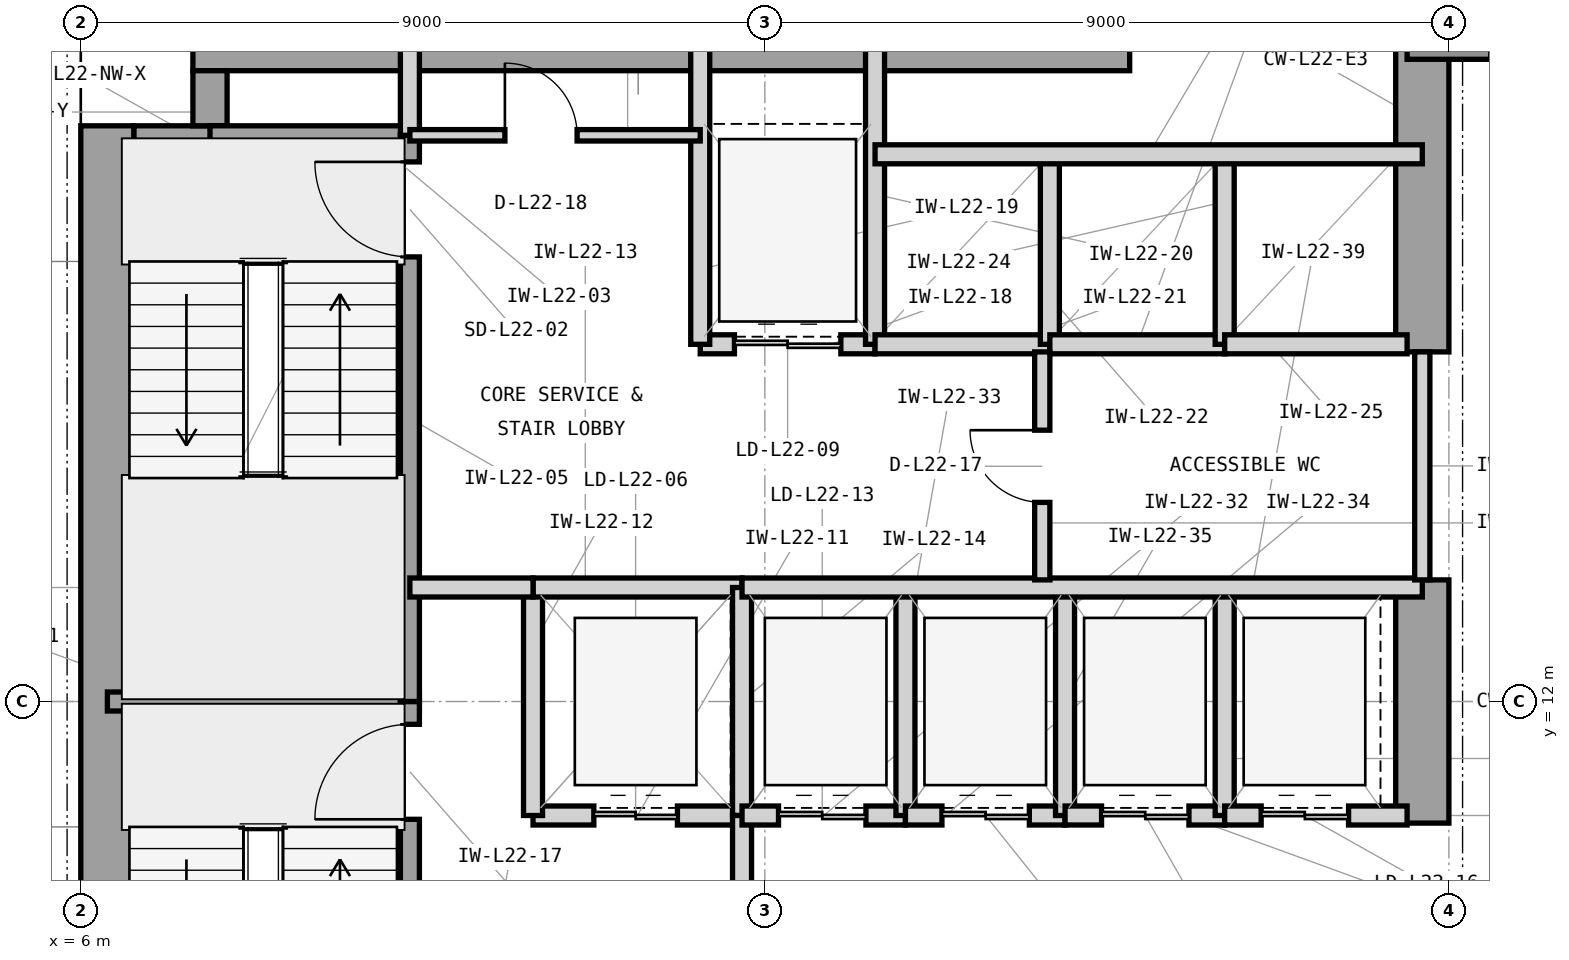
"""IFC4 building model, lengths in metres.
Left out: names, types, materials, properties, quantities, classifications, styles, units other than length and angle.
Written with IfcOpenShell. Run it as: python <this file> out.ifc"""

import sys

from ifc_helpers import new_model, si_unit, direction, frame, frame_2d, origin, origin_2d, place, context, subcontext, project, spatial, rectangle, extrude, element, fill, save


model = new_model("IFC4")
c1 = context("Model", 3, precision=1e-05, world=origin(), true_north=direction((0.0, 1.0)))
c2 = subcontext(c1, "Body", "Model", "MODEL_VIEW")
j1 = project(units=[si_unit("LENGTHUNIT", "METRE"), si_unit("PLANEANGLEUNIT", "RADIAN")], contexts=[c1])
p1 = place(None, origin())
s1 = spatial("IfcSite", under=j1, at=p1, CompositionType="ELEMENT")
p2 = place(p1, origin())
s2 = spatial("IfcBuilding", under=s1, at=p2, CompositionType="ELEMENT")
p3 = place(p2, frame((0.0, 0.0, 97.2)))
s3 = spatial("IfcBuildingStorey", under=s2, at=p3, CompositionType="ELEMENT", Elevation=97.2)
p4 = place(p3, frame((6.35, 4.425, 0.0), z_axis=(0.0, 0.0, 1.0), x_axis=(0.0, 1.0, 0.0)))
e1 = element("IfcWall", 1, at=p4, inside=s3, PredefinedType="SHEAR", context=c2, shape_type="SweptSolid", body=[
    extrude(rectangle(XDim=15.15, YDim=0.7, at=frame_2d((7.575, 0.0))), origin(), (0.0, 0.0, 1.0), 3.9),
])
p5 = place(p3, frame((7.475, 20.65, 0.0), z_axis=(0.0, 0.0, 1.0), x_axis=(1.0, 0.0, 0.0)))
e2 = element("IfcWall", 2, at=p5, inside=s3, PredefinedType="SHEAR", context=c2, shape_type="SweptSolid", body=[
    extrude(rectangle(XDim=12.325, YDim=0.7, at=frame_2d((6.163, 0.0))), origin(), (0.0, 0.0, 1.0), 3.9),
])
p6 = place(p3, frame((23.65, 10.4, 0.0), z_axis=(0.0, 0.0, 1.0), x_axis=(0.0, 1.0, 0.0)))
e3 = element("IfcWall", 3, at=p6, inside=s3, PredefinedType="SHEAR", context=c2, shape_type="SweptSolid", body=[
    extrude(rectangle(XDim=3.2, YDim=0.7, at=frame_2d((1.6, 0.0))), origin(), (0.0, 0.0, 1.0), 3.9),
])
p7 = place(p3, frame((23.65, 16.6, 0.0), z_axis=(0.0, 0.0, 1.0), x_axis=(0.0, 1.0, 0.0)))
e4 = element("IfcWall", 4, at=p7, inside=s3, PredefinedType="SHEAR", context=c2, shape_type="SweptSolid", body=[
    extrude(rectangle(XDim=4.05, YDim=0.7, at=frame_2d((2.025, 0.0))), origin(), (0.0, 0.0, 1.0), 3.9),
])
p8 = place(p3, frame((6.7, 19.35, 0.0), z_axis=(0.0, 0.0, 1.0), x_axis=(1.0, 0.0, 0.0)))
e5 = element("IfcWall", 5, at=p8, inside=s3, PredefinedType="SHEAR", context=c2, shape_type="SweptSolid", body=[
    extrude(rectangle(XDim=1.225, YDim=0.45, at=frame_2d((0.613, 0.0))), origin(), (0.0, 0.0, 1.0), 3.9),
])
p9 = place(p3, frame((7.7, 19.575, 0.0), z_axis=(0.0, 0.0, 1.0), x_axis=(0.0, 1.0, 0.0)))
e6 = element("IfcWall", 6, at=p9, inside=s3, PredefinedType="SHEAR", context=c2, shape_type="SweptSolid", body=[
    extrude(rectangle(XDim=0.725, YDim=0.45, at=frame_2d((0.363, 0.0))), origin(), (0.0, 0.0, 1.0), 3.9),
])
p10 = place(p3, frame((24.0, 21.0, 0.0), z_axis=(0.0, 0.0, 1.0), x_axis=(1.0, 0.0, 0.0)))
e7 = element("IfcColumn", 7, at=p10, inside=s3, PredefinedType="COLUMN", context=c2, shape_type="SweptSolid", body=[
    extrude(rectangle(XDim=1.1, YDim=1.1, at=origin_2d()), origin(), (0.0, 0.0, 1.0), 3.9),
])
p11 = place(p3, frame((6.35, 12.0, 0.0), z_axis=(0.0, 0.0, 1.0), x_axis=(1.0, 0.0, 0.0)))
e8 = element("IfcWall", 8, at=p11, inside=s3, PredefinedType="SHEAR", context=c2, shape_type="SweptSolid", body=[
    extrude(rectangle(XDim=4.105, YDim=0.25, at=frame_2d((2.052, 0.0))), origin(), (0.0, 0.0, 1.0), 3.9),
])
p12 = place(p3, frame((7.7, 19.45, 0.0), z_axis=(0.0, 0.0, 1.0), x_axis=(1.0, 0.0, 0.0)))
e9 = element("IfcWall", 9, at=p12, inside=s3, PredefinedType="SHEAR", context=c2, shape_type="SweptSolid", body=[
    extrude(rectangle(XDim=2.755, YDim=0.25, at=frame_2d((1.377, 0.0))), origin(), (0.0, 0.0, 1.0), 3.9),
])
p13 = place(p3, frame((10.33, 4.55, 0.0), z_axis=(0.0, 0.0, 1.0), x_axis=(0.0, 1.0, 0.0)))
e10 = element("IfcWall", 10, at=p13, inside=s3, PredefinedType="SHEAR", context=c2, shape_type="SweptSolid", body=[
    extrude(rectangle(XDim=7.45, YDim=0.25, at=frame_2d((3.725, 0.0))), origin(), (0.0, 0.0, 1.0), 3.9),
])
p14 = place(p13, frame((5.9, 0.0, 0.0)))
e11 = element("IfcOpeningElement", 11, at=p14, cuts=e10, PredefinedType="OPENING", context=c2, shape_type="SweptSolid", body=[
    extrude(rectangle(XDim=1.25, YDim=2.2, at=frame_2d((0.625, 1.1))), frame((0.0, 0.135, 0.0), z_axis=(0.0, -1.0, 0.0), x_axis=(1.0, 0.0, 0.0)), (0.0, 0.0, 1.0), 0.27),
])
p15 = place(p3, frame((10.33, 12.0, 0.0), z_axis=(0.0, 0.0, 1.0), x_axis=(0.0, 1.0, 0.0)))
e12 = element("IfcWall", 12, at=p15, inside=s3, PredefinedType="SHEAR", context=c2, shape_type="SweptSolid", body=[
    extrude(rectangle(XDim=7.45, YDim=0.25, at=frame_2d((3.725, 0.0))), origin(), (0.0, 0.0, 1.0), 3.9),
])
p16 = place(p15, frame((5.85, 0.0, 0.0)))
e13 = element("IfcOpeningElement", 13, at=p16, cuts=e12, PredefinedType="OPENING", context=c2, shape_type="SweptSolid", body=[
    extrude(rectangle(XDim=1.25, YDim=2.2, at=frame_2d((0.625, 1.1))), frame((0.0, 0.135, 0.0), z_axis=(0.0, -1.0, 0.0), x_axis=(1.0, 0.0, 0.0)), (0.0, 0.0, 1.0), 0.27),
])
p17 = place(p3, frame((10.33, 19.45, 0.0), z_axis=(0.0, 0.0, 1.0), x_axis=(0.0, 1.0, 0.0)))
e14 = element("IfcWall", 14, at=p17, inside=s3, PredefinedType="PARTITIONING", context=c2, shape_type="SweptSolid", body=[
    extrude(rectangle(XDim=1.2, YDim=0.25, at=frame_2d((0.6, 0.0))), origin(), (0.0, 0.0, 1.0), 2.917),
])
p18 = place(p3, frame((11.95, 10.5, 0.0), z_axis=(0.0, 0.0, 1.0), x_axis=(1.0, 0.0, 0.0)))
e15 = element("IfcWall", 15, at=p18, inside=s3, PredefinedType="PARTITIONING", context=c2, shape_type="SweptSolid", body=[
    extrude(rectangle(XDim=2.75, YDim=0.25, at=frame_2d((1.375, 0.0))), origin(), (0.0, 0.0, 1.0), 3.227),
])
p19 = place(p18, frame((0.8, 0.0, 0.0)))
e16 = element("IfcOpeningElement", 16, at=p19, cuts=e15, PredefinedType="OPENING", context=c2, shape_type="SweptSolid", body=[
    extrude(rectangle(XDim=1.1, YDim=2.25, at=frame_2d((0.55, 1.125))), frame((0.0, 0.135, 0.0), z_axis=(0.0, -1.0, 0.0), x_axis=(1.0, 0.0, 0.0)), (0.0, 0.0, 1.0), 0.27),
])
p20 = place(p3, frame((11.95, 10.5, 0.0), z_axis=(0.0, 0.0, 1.0), x_axis=(0.0, 1.0, 0.0)))
e17 = element("IfcWall", 17, at=p20, inside=s3, PredefinedType="PARTITIONING", context=c2, shape_type="SweptSolid", body=[
    extrude(rectangle(XDim=3.0, YDim=0.25, at=frame_2d((1.5, 0.0))), origin(), (0.0, 0.0, 1.0), 3.69),
])
p21 = place(p3, frame((11.95, 13.5, 0.0), z_axis=(0.0, 0.0, 1.0), x_axis=(1.0, 0.0, 0.0)))
e18 = element("IfcWall", 18, at=p21, inside=s3, PredefinedType="PARTITIONING", context=c2, shape_type="SweptSolid", body=[
    extrude(rectangle(XDim=2.75, YDim=0.25, at=frame_2d((1.375, 0.0))), origin(), (0.0, 0.0, 1.0), 3.227),
])
p22 = place(p3, frame((14.7, 10.5, 0.0), z_axis=(0.0, 0.0, 1.0), x_axis=(0.0, 1.0, 0.0)))
e19 = element("IfcWall", 19, at=p22, inside=s3, PredefinedType="PARTITIONING", context=c2, shape_type="SweptSolid", body=[
    extrude(rectangle(XDim=3.0, YDim=0.25, at=frame_2d((1.5, 0.0))), origin(), (0.0, 0.0, 1.0), 3.69),
])
p23 = place(p3, frame((14.7, 6.7, 0.0), z_axis=(0.0, 0.0, 1.0), x_axis=(0.0, 1.0, 0.0)))
e20 = element("IfcWall", 20, at=p23, inside=s3, PredefinedType="PARTITIONING", context=c2, shape_type="SweptSolid", body=[
    extrude(rectangle(XDim=3.8, YDim=0.25, at=frame_2d((1.9, 0.0))), origin(), (0.0, 0.0, 1.0), 3.69),
])
p24 = place(p23, frame((1.3, 0.0, 0.0)))
e21 = element("IfcOpeningElement", 21, at=p24, cuts=e20, PredefinedType="OPENING", context=c2, shape_type="SweptSolid", body=[
    extrude(rectangle(XDim=1.2, YDim=2.2, at=frame_2d((0.6, 1.1))), frame((0.0, 0.135, 0.0), z_axis=(0.0, -1.0, 0.0), x_axis=(1.0, 0.0, 0.0)), (0.0, 0.0, 1.0), 0.27),
])
p25 = place(p3, frame((10.33, 13.5, 0.0), z_axis=(0.0, 0.0, 1.0), x_axis=(1.0, 0.0, 0.0)))
e22 = element("IfcWall", 22, at=p25, inside=s3, PredefinedType="PARTITIONING", context=c2, shape_type="SweptSolid", body=[
    extrude(rectangle(XDim=1.62, YDim=0.25, at=frame_2d((0.81, 0.0))), origin(), (0.0, 0.0, 1.0), 3.227),
])
p26 = place(p3, frame((14.15, 16.7, 0.0), z_axis=(0.0, 0.0, 1.0), x_axis=(1.0, 0.0, 0.0)))
e23 = element("IfcWall", 23, at=p26, inside=s3, PredefinedType="PARTITIONING", context=c2, shape_type="SweptSolid", body=[
    extrude(rectangle(XDim=2.3, YDim=0.25, at=frame_2d((1.15, 0.0))), origin(), (0.0, 0.0, 1.0), 3.227),
])
p27 = place(p26, frame((0.45, 0.0, 0.0)))
e24 = element("IfcOpeningElement", 24, at=p27, cuts=e23, PredefinedType="OPENING", context=c2, shape_type="SweptSolid", body=[
    extrude(rectangle(XDim=1.4, YDim=2.35, at=frame_2d((0.7, 1.175))), frame((0.0, 0.135, 0.0), z_axis=(0.0, -1.0, 0.0), x_axis=(1.0, 0.0, 0.0)), (0.0, 0.0, 1.0), 0.27),
])
for number, where, z_axis, x_axis in (
    (25, (14.15, 16.7, 0.0), (0.0, 0.0, 1.0), (0.0, 1.0, 0.0)),
    (26, (16.45, 16.7, 0.0), (0.0, 0.0, 1.0), (0.0, 1.0, 0.0)),
):
    element("IfcWall", number, at=place(p3, frame(where, z_axis=z_axis, x_axis=x_axis)), inside=s3, PredefinedType="PARTITIONING", context=c2, shape_type="SweptSolid", body=[
        extrude(rectangle(XDim=3.95, YDim=0.25, at=frame_2d((1.975, 0.0))), origin(), (0.0, 0.0, 1.0), 3.69),
    ])
p28 = place(p3, frame((16.45, 16.7, 0.0), z_axis=(0.0, 0.0, 1.0), x_axis=(1.0, 0.0, 0.0)))
e27 = element("IfcWall", 27, at=p28, inside=s3, PredefinedType="PARTITIONING", context=c2, shape_type="SweptSolid", body=[
    extrude(rectangle(XDim=2.3, YDim=0.25, at=frame_2d((1.15, 0.0))), origin(), (0.0, 0.0, 1.0), 3.227),
])
p29 = place(p3, frame((18.75, 16.7, 0.0), z_axis=(0.0, 0.0, 1.0), x_axis=(0.0, 1.0, 0.0)))
e28 = element("IfcWall", 28, at=p29, inside=s3, PredefinedType="PARTITIONING", context=c2, shape_type="SweptSolid", body=[
    extrude(rectangle(XDim=2.5, YDim=0.25, at=frame_2d((1.25, 0.0))), origin(), (0.0, 0.0, 1.0), 3.69),
])
p30 = place(p3, frame((18.75, 16.7, 0.0), z_axis=(0.0, 0.0, 1.0), x_axis=(1.0, 0.0, 0.0)))
e29 = element("IfcWall", 29, at=p30, inside=s3, PredefinedType="PARTITIONING", context=c2, shape_type="SweptSolid", body=[
    extrude(rectangle(XDim=2.3, YDim=0.25, at=frame_2d((1.15, 0.0))), origin(), (0.0, 0.0, 1.0), 3.227),
])
p31 = place(p3, frame((21.05, 16.7, 0.0), z_axis=(0.0, 0.0, 1.0), x_axis=(0.0, 1.0, 0.0)))
e30 = element("IfcWall", 30, at=p31, inside=s3, PredefinedType="PARTITIONING", context=c2, shape_type="SweptSolid", body=[
    extrude(rectangle(XDim=2.5, YDim=0.25, at=frame_2d((1.25, 0.0))), origin(), (0.0, 0.0, 1.0), 3.69),
])
p32 = place(p3, frame((21.05, 16.7, 0.0), z_axis=(0.0, 0.0, 1.0), x_axis=(1.0, 0.0, 0.0)))
e31 = element("IfcWall", 31, at=p32, inside=s3, PredefinedType="PARTITIONING", context=c2, shape_type="SweptSolid", body=[
    extrude(rectangle(XDim=2.4, YDim=0.25, at=frame_2d((1.2, 0.0))), origin(), (0.0, 0.0, 1.0), 3.227),
])
p33 = place(p3, frame((16.45, 19.2, 0.0), z_axis=(0.0, 0.0, 1.0), x_axis=(1.0, 0.0, 0.0)))
e32 = element("IfcWall", 32, at=p33, inside=s3, PredefinedType="PARTITIONING", context=c2, shape_type="SweptSolid", body=[
    extrude(rectangle(XDim=7.2, YDim=0.25, at=frame_2d((3.6, 0.0))), origin(), (0.0, 0.0, 1.0), 3.69),
])
p34 = place(p3, frame((14.7, 10.5, 0.0), z_axis=(0.0, 0.0, 1.0), x_axis=(1.0, 0.0, 0.0)))
e33 = element("IfcWall", 33, at=p34, inside=s3, PredefinedType="PARTITIONING", context=c2, shape_type="SweptSolid", body=[
    extrude(rectangle(XDim=2.15, YDim=0.25, at=frame_2d((1.075, 0.0))), origin(), (0.0, 0.0, 1.0), 3.227),
])
p35 = place(p34, frame((0.48, 0.0, 0.0)))
e34 = element("IfcOpeningElement", 34, at=p35, cuts=e33, PredefinedType="OPENING", context=c2, shape_type="SweptSolid", body=[
    extrude(rectangle(XDim=1.15, YDim=2.25, at=frame_2d((0.575, 1.125))), frame((0.0, 0.135, 0.0), z_axis=(0.0, -1.0, 0.0), x_axis=(1.0, 0.0, 0.0)), (0.0, 0.0, 1.0), 0.27),
])
p36 = place(p3, frame((16.85, 10.5, 0.0), z_axis=(0.0, 0.0, 1.0), x_axis=(0.0, 1.0, 0.0)))
e35 = element("IfcWall", 35, at=p36, inside=s3, PredefinedType="PARTITIONING", context=c2, shape_type="SweptSolid", body=[
    extrude(rectangle(XDim=3.0, YDim=0.25, at=frame_2d((1.5, 0.0))), origin(), (0.0, 0.0, 1.0), 3.69),
])
p37 = place(p3, frame((16.85, 10.5, 0.0), z_axis=(0.0, 0.0, 1.0), x_axis=(1.0, 0.0, 0.0)))
e36 = element("IfcWall", 36, at=p37, inside=s3, PredefinedType="PARTITIONING", context=c2, shape_type="SweptSolid", body=[
    extrude(rectangle(XDim=2.1, YDim=0.25, at=frame_2d((1.05, 0.0))), origin(), (0.0, 0.0, 1.0), 3.227),
])
p38 = place(p37, frame((0.48, 0.0, 0.0)))
e37 = element("IfcOpeningElement", 37, at=p38, cuts=e36, PredefinedType="OPENING", context=c2, shape_type="SweptSolid", body=[
    extrude(rectangle(XDim=1.15, YDim=2.25, at=frame_2d((0.575, 1.125))), frame((0.0, 0.135, 0.0), z_axis=(0.0, -1.0, 0.0), x_axis=(1.0, 0.0, 0.0)), (0.0, 0.0, 1.0), 0.27),
])
p39 = place(p3, frame((18.95, 10.5, 0.0), z_axis=(0.0, 0.0, 1.0), x_axis=(0.0, 1.0, 0.0)))
e38 = element("IfcWall", 38, at=p39, inside=s3, PredefinedType="PARTITIONING", context=c2, shape_type="SweptSolid", body=[
    extrude(rectangle(XDim=3.0, YDim=0.25, at=frame_2d((1.5, 0.0))), origin(), (0.0, 0.0, 1.0), 3.69),
])
p40 = place(p3, frame((18.95, 10.5, 0.0), z_axis=(0.0, 0.0, 1.0), x_axis=(1.0, 0.0, 0.0)))
e39 = element("IfcWall", 39, at=p40, inside=s3, PredefinedType="PARTITIONING", context=c2, shape_type="SweptSolid", body=[
    extrude(rectangle(XDim=2.1, YDim=0.25, at=frame_2d((1.05, 0.0))), origin(), (0.0, 0.0, 1.0), 3.227),
])
p41 = place(p40, frame((0.48, 0.0, 0.0)))
e40 = element("IfcOpeningElement", 40, at=p41, cuts=e39, PredefinedType="OPENING", context=c2, shape_type="SweptSolid", body=[
    extrude(rectangle(XDim=1.15, YDim=2.25, at=frame_2d((0.575, 1.125))), frame((0.0, 0.135, 0.0), z_axis=(0.0, -1.0, 0.0), x_axis=(1.0, 0.0, 0.0)), (0.0, 0.0, 1.0), 0.27),
])
p42 = place(p3, frame((21.05, 10.5, 0.0), z_axis=(0.0, 0.0, 1.0), x_axis=(0.0, 1.0, 0.0)))
e41 = element("IfcWall", 41, at=p42, inside=s3, PredefinedType="PARTITIONING", context=c2, shape_type="SweptSolid", body=[
    extrude(rectangle(XDim=3.0, YDim=0.25, at=frame_2d((1.5, 0.0))), origin(), (0.0, 0.0, 1.0), 3.69),
])
p43 = place(p3, frame((21.05, 10.5, 0.0), z_axis=(0.0, 0.0, 1.0), x_axis=(1.0, 0.0, 0.0)))
e42 = element("IfcWall", 42, at=p43, inside=s3, PredefinedType="PARTITIONING", context=c2, shape_type="SweptSolid", body=[
    extrude(rectangle(XDim=2.4, YDim=0.25, at=frame_2d((1.2, 0.0))), origin(), (0.0, 0.0, 1.0), 3.227),
])
p44 = place(p43, frame((0.48, 0.0, 0.0)))
e43 = element("IfcOpeningElement", 43, at=p44, cuts=e42, PredefinedType="OPENING", context=c2, shape_type="SweptSolid", body=[
    extrude(rectangle(XDim=1.15, YDim=2.25, at=frame_2d((0.575, 1.125))), frame((0.0, 0.135, 0.0), z_axis=(0.0, -1.0, 0.0), x_axis=(1.0, 0.0, 0.0)), (0.0, 0.0, 1.0), 0.27),
])
p45 = place(p3, frame((14.7, 13.5, 0.0), z_axis=(0.0, 0.0, 1.0), x_axis=(1.0, 0.0, 0.0)))
e44 = element("IfcWall", 44, at=p45, inside=s3, PredefinedType="PARTITIONING", context=c2, shape_type="SweptSolid", body=[
    extrude(rectangle(XDim=8.95, YDim=0.25, at=frame_2d((4.475, 0.0))), origin(), (0.0, 0.0, 1.0), 3.227),
])
p46 = place(p3, frame((18.65, 13.6, 0.0), z_axis=(0.0, 0.0, 1.0), x_axis=(0.0, 1.0, 0.0)))
e45 = element("IfcWall", 45, at=p46, inside=s3, PredefinedType="PARTITIONING", context=c2, shape_type="SweptSolid", body=[
    extrude(rectangle(XDim=3.0, YDim=0.2, at=frame_2d((1.5, 0.0))), origin(), (0.0, 0.0, 1.0), 3.69),
])
p47 = place(p46, frame((1.02, 0.0, 0.0)))
e46 = element("IfcOpeningElement", 46, at=p47, cuts=e45, PredefinedType="OPENING", context=c2, shape_type="SweptSolid", body=[
    extrude(rectangle(XDim=0.95, YDim=2.1, at=frame_2d((0.475, 1.05))), frame((0.0, 0.11, 0.0), z_axis=(0.0, -1.0, 0.0), x_axis=(1.0, 0.0, 0.0)), (0.0, 0.0, 1.0), 0.22),
])
p48 = place(p3, frame((23.65, 13.6, 0.0), z_axis=(0.0, 0.0, 1.0), x_axis=(0.0, 1.0, 0.0)))
e47 = element("IfcWall", 47, at=p48, inside=s3, PredefinedType="PARTITIONING", context=c2, shape_type="SweptSolid", body=[
    extrude(rectangle(XDim=3.0, YDim=0.2, at=frame_2d((1.5, 0.0))), origin(), (0.0, 0.0, 1.0), 3.69),
])
p49 = place(p3, frame((10.33, 19.45, 0.0), z_axis=(0.0, 0.0, 1.0), x_axis=(1.0, 0.0, 0.0)))
e48 = element("IfcWall", 48, at=p49, inside=s3, PredefinedType="PARTITIONING", context=c2, shape_type="SweptSolid", body=[
    extrude(rectangle(XDim=3.82, YDim=0.15, at=frame_2d((1.91, 0.0))), origin(), (0.0, 0.0, 1.0), 3.69),
])
p50 = place(p49, frame((1.25, 0.0, 0.0)))
e49 = element("IfcOpeningElement", 49, at=p50, cuts=e48, PredefinedType="OPENING", context=c2, shape_type="SweptSolid", body=[
    extrude(rectangle(XDim=0.95, YDim=2.1, at=frame_2d((0.475, 1.05))), frame((0.0, 0.085, 0.0), z_axis=(0.0, -1.0, 0.0), x_axis=(1.0, 0.0, 0.0)), (0.0, 0.0, 1.0), 0.17),
])
p51 = place(p14, origin())
e50 = element("IfcDoor", 50, at=p51, inside=s3, OperationType="SINGLE_SWING_LEFT", PredefinedType="DOOR", context=c2, shape_type="SweptSolid", body=[
    extrude(rectangle(XDim=1.25, YDim=2.2, at=frame_2d((0.625, 1.1))), frame((0.0, 0.025, 0.0), z_axis=(0.0, -1.0, 0.0), x_axis=(1.0, 0.0, 0.0)), (0.0, 0.0, 1.0), 0.05),
])
fill(e11, e50)
p52 = place(p16, origin())
e51 = element("IfcDoor", 51, at=p52, inside=s3, OperationType="SINGLE_SWING_RIGHT", PredefinedType="DOOR", context=c2, shape_type="SweptSolid", body=[
    extrude(rectangle(XDim=1.25, YDim=2.2, at=frame_2d((0.625, 1.1))), frame((0.0, 0.025, 0.0), z_axis=(0.0, -1.0, 0.0), x_axis=(1.0, 0.0, 0.0)), (0.0, 0.0, 1.0), 0.05),
])
fill(e13, e51)
p53 = place(p19, origin())
e52 = element("IfcDoor", 52, at=p53, inside=s3, OperationType="DOUBLE_DOOR_SLIDING", PredefinedType="DOOR", context=c2, shape_type="SweptSolid", body=[
    extrude(rectangle(XDim=1.1, YDim=2.25, at=frame_2d((0.55, 1.125))), frame((0.0, 0.025, 0.0), z_axis=(0.0, -1.0, 0.0), x_axis=(1.0, 0.0, 0.0)), (0.0, 0.0, 1.0), 0.05),
])
fill(e16, e52)
p54 = place(p27, origin())
e53 = element("IfcDoor", 53, at=p54, inside=s3, OperationType="DOUBLE_DOOR_SLIDING", PredefinedType="DOOR", context=c2, shape_type="SweptSolid", body=[
    extrude(rectangle(XDim=1.4, YDim=2.35, at=frame_2d((0.7, 1.175))), frame((0.0, 0.025, 0.0), z_axis=(0.0, -1.0, 0.0), x_axis=(1.0, 0.0, 0.0)), (0.0, 0.0, 1.0), 0.05),
])
fill(e24, e53)
p55 = place(p35, origin())
e54 = element("IfcDoor", 54, at=p55, inside=s3, OperationType="DOUBLE_DOOR_SLIDING", PredefinedType="DOOR", context=c2, shape_type="SweptSolid", body=[
    extrude(rectangle(XDim=1.15, YDim=2.25, at=frame_2d((0.575, 1.125))), frame((0.0, 0.025, 0.0), z_axis=(0.0, -1.0, 0.0), x_axis=(1.0, 0.0, 0.0)), (0.0, 0.0, 1.0), 0.05),
])
fill(e34, e54)
p56 = place(p38, origin())
e55 = element("IfcDoor", 55, at=p56, inside=s3, OperationType="DOUBLE_DOOR_SLIDING", PredefinedType="DOOR", context=c2, shape_type="SweptSolid", body=[
    extrude(rectangle(XDim=1.15, YDim=2.25, at=frame_2d((0.575, 1.125))), frame((0.0, 0.025, 0.0), z_axis=(0.0, -1.0, 0.0), x_axis=(1.0, 0.0, 0.0)), (0.0, 0.0, 1.0), 0.05),
])
fill(e37, e55)
p57 = place(p41, origin())
e56 = element("IfcDoor", 56, at=p57, inside=s3, OperationType="DOUBLE_DOOR_SLIDING", PredefinedType="DOOR", context=c2, shape_type="SweptSolid", body=[
    extrude(rectangle(XDim=1.15, YDim=2.25, at=frame_2d((0.575, 1.125))), frame((0.0, 0.025, 0.0), z_axis=(0.0, -1.0, 0.0), x_axis=(1.0, 0.0, 0.0)), (0.0, 0.0, 1.0), 0.05),
])
fill(e40, e56)
p58 = place(p44, origin())
e57 = element("IfcDoor", 57, at=p58, inside=s3, OperationType="DOUBLE_DOOR_SLIDING", PredefinedType="DOOR", context=c2, shape_type="SweptSolid", body=[
    extrude(rectangle(XDim=1.15, YDim=2.25, at=frame_2d((0.575, 1.125))), frame((0.0, 0.025, 0.0), z_axis=(0.0, -1.0, 0.0), x_axis=(1.0, 0.0, 0.0)), (0.0, 0.0, 1.0), 0.05),
])
fill(e43, e57)
p59 = place(p47, origin())
e58 = element("IfcDoor", 58, at=p59, inside=s3, OperationType="SINGLE_SWING_RIGHT", PredefinedType="DOOR", context=c2, shape_type="SweptSolid", body=[
    extrude(rectangle(XDim=0.95, YDim=2.1, at=frame_2d((0.475, 1.05))), frame((0.0, 0.025, 0.0), z_axis=(0.0, -1.0, 0.0), x_axis=(1.0, 0.0, 0.0)), (0.0, 0.0, 1.0), 0.05),
])
fill(e46, e58)
p60 = place(p50, origin())
e59 = element("IfcDoor", 59, at=p60, inside=s3, OperationType="SINGLE_SWING_LEFT", PredefinedType="DOOR", context=c2, shape_type="SweptSolid", body=[
    extrude(rectangle(XDim=0.95, YDim=2.1, at=frame_2d((0.475, 1.05))), frame((0.0, 0.025, 0.0), z_axis=(0.0, -1.0, 0.0), x_axis=(1.0, 0.0, 0.0)), (0.0, 0.0, 1.0), 0.05),
])
fill(e49, e59)
save(model, sys.argv[1])
